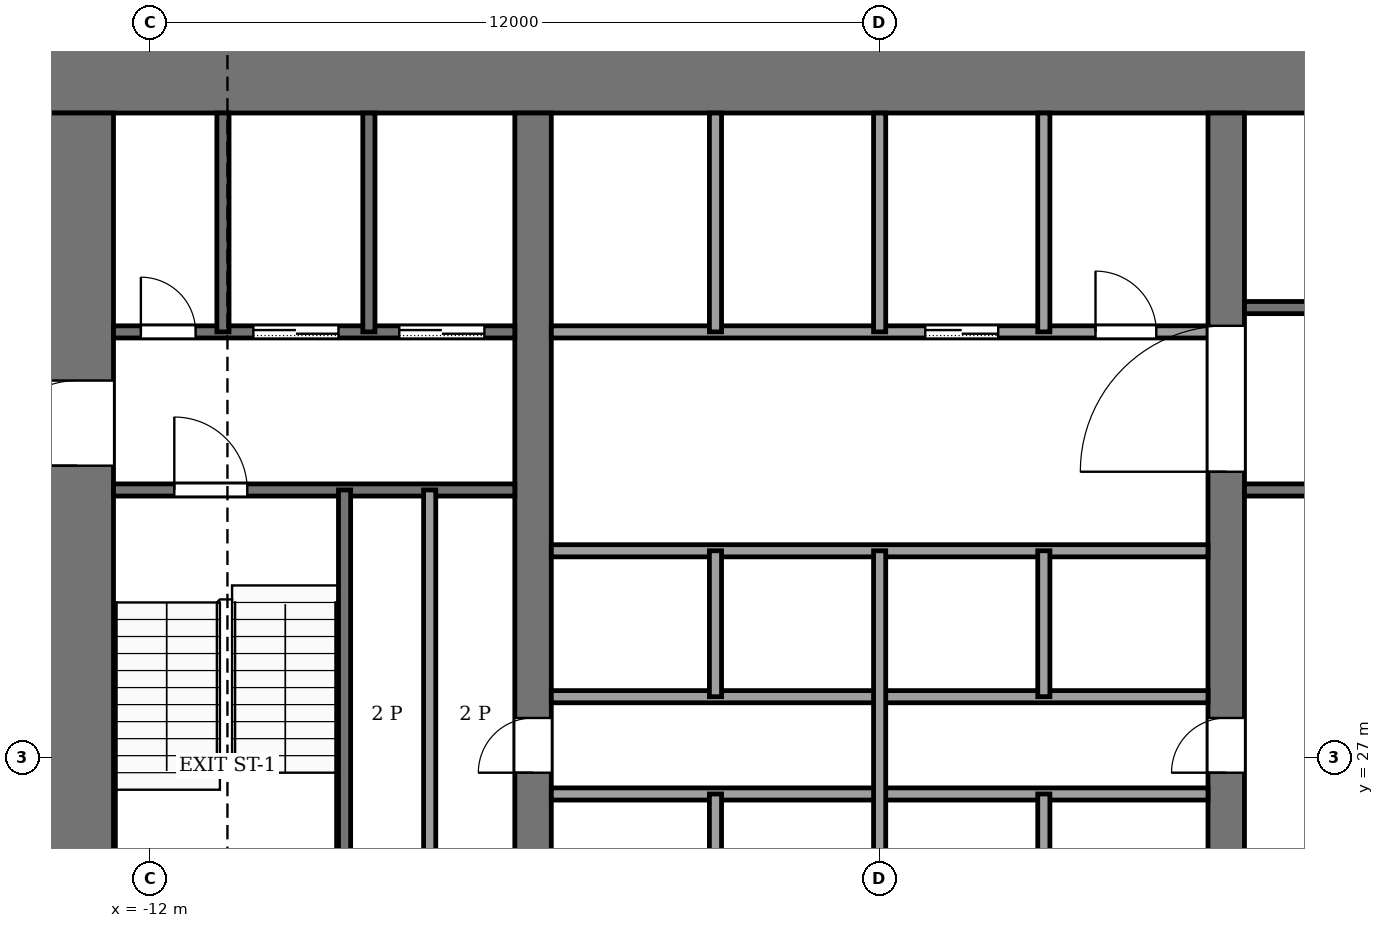
"""IFC4 building model, lengths in metres.
Left out: names, types, materials, properties, quantities, classifications, styles, units other than length and angle.
Written with IfcOpenShell. Run it as: python <this file> out.ifc"""

import sys

from ifc_helpers import new_model, si_unit, direction, frame, frame_2d, origin, place, context, subcontext, project, spatial, rectangle, extrude, element, fill, save


model = new_model("IFC4")
c1 = context("Model", 3, precision=1e-05, world=origin(), true_north=direction((0.0, 1.0)))
c2 = subcontext(c1, "Body", "Model", "MODEL_VIEW")
j1 = project(units=[si_unit("LENGTHUNIT", "METRE"), si_unit("PLANEANGLEUNIT", "RADIAN")], contexts=[c1])
p1 = place(None, origin())
s1 = spatial("IfcSite", under=j1, at=p1, CompositionType="ELEMENT")
p2 = place(p1, origin())
s2 = spatial("IfcBuilding", under=s1, at=p2, CompositionType="ELEMENT")
p3 = place(p2, frame((0.0, 0.0, 90.0)))
s3 = spatial("IfcBuildingStorey", under=s2, at=p3, CompositionType="ELEMENT", Elevation=90.0)
p4 = place(p3, frame((-13.8, 38.2, -0.13), z_axis=(0.0, 0.0, 1.0), x_axis=(1.0, 0.0, 0.0)))
e1 = element("IfcWall", 1, at=p4, inside=s3, PredefinedType="SHEAR", context=c2, shape_type="SweptSolid", body=[
    extrude(rectangle(XDim=27.6, YDim=1.2, at=frame_2d((13.8, 0.0))), origin(), (0.0, 0.0, 1.0), 4.0),
])
p5 = place(p3, frame((-13.2, 18.4, -0.13), z_axis=(0.0, 0.0, 1.0), x_axis=(0.0, 1.0, 0.0)))
e2 = element("IfcWall", 2, at=p5, inside=s3, PredefinedType="SHEAR", context=c2, shape_type="SweptSolid", body=[
    extrude(rectangle(XDim=19.2, YDim=1.2, at=frame_2d((9.6, 0.0))), origin(), (0.0, 0.0, 1.0), 4.0),
])
p6 = place(p5, frame((2.8, 0.0, 0.13)))
e3 = element("IfcOpeningElement", 3, at=p6, cuts=e2, PredefinedType="OPENING", context=c2, shape_type="SweptSolid", body=[
    extrude(rectangle(XDim=2.4, YDim=2.4, at=frame_2d((1.2, 1.2))), frame((0.0, 0.61, 0.0), z_axis=(0.0, -1.0, 0.0), x_axis=(1.0, 0.0, 0.0)), (0.0, 0.0, 1.0), 1.22),
])
p7 = place(p5, frame((13.4, 0.0, 0.13)))
e4 = element("IfcOpeningElement", 4, at=p7, cuts=e2, PredefinedType="OPENING", context=c2, shape_type="SweptSolid", body=[
    extrude(rectangle(XDim=1.4, YDim=2.2, at=frame_2d((0.7, 1.1))), frame((0.0, 0.61, 0.0), z_axis=(0.0, -1.0, 0.0), x_axis=(1.0, 0.0, 0.0)), (0.0, 0.0, 1.0), 1.22),
])
p8 = place(p3, frame((-5.7, 18.4, -0.13), z_axis=(0.0, 0.0, 1.0), x_axis=(0.0, 1.0, 0.0)))
e5 = element("IfcWall", 5, at=p8, inside=s3, PredefinedType="SHEAR", context=c2, shape_type="SweptSolid", body=[
    extrude(rectangle(XDim=19.2, YDim=0.6, at=frame_2d((9.6, 0.0))), origin(), (0.0, 0.0, 1.0), 4.0),
])
p9 = place(p8, frame((8.35, 0.0, 0.13)))
e6 = element("IfcOpeningElement", 6, at=p9, cuts=e5, PredefinedType="OPENING", context=c2, shape_type="SweptSolid", body=[
    extrude(rectangle(XDim=0.9, YDim=2.1, at=frame_2d((0.45, 1.05))), frame((0.0, 0.31, 0.0), z_axis=(0.0, -1.0, 0.0), x_axis=(1.0, 0.0, 0.0)), (0.0, 0.0, 1.0), 0.62),
])
p10 = place(p3, frame((5.7, 18.4, -0.13), z_axis=(0.0, 0.0, 1.0), x_axis=(0.0, 1.0, 0.0)))
e7 = element("IfcWall", 7, at=p10, inside=s3, PredefinedType="SHEAR", context=c2, shape_type="SweptSolid", body=[
    extrude(rectangle(XDim=19.2, YDim=0.6, at=frame_2d((9.6, 0.0))), origin(), (0.0, 0.0, 1.0), 4.0),
])
p11 = place(p10, frame((8.35, 0.0, 0.13)))
e8 = element("IfcOpeningElement", 8, at=p11, cuts=e7, PredefinedType="OPENING", context=c2, shape_type="SweptSolid", body=[
    extrude(rectangle(XDim=0.9, YDim=2.1, at=frame_2d((0.45, 1.05))), frame((0.0, 0.31, 0.0), z_axis=(0.0, -1.0, 0.0), x_axis=(1.0, 0.0, 0.0)), (0.0, 0.0, 1.0), 0.62),
])
p12 = place(p10, frame((13.3, 0.0, 0.13)))
e9 = element("IfcOpeningElement", 9, at=p12, cuts=e7, PredefinedType="OPENING", context=c2, shape_type="SweptSolid", body=[
    extrude(rectangle(XDim=2.4, YDim=2.4, at=frame_2d((1.2, 1.2))), frame((0.0, 0.31, 0.0), z_axis=(0.0, -1.0, 0.0), x_axis=(1.0, 0.0, 0.0)), (0.0, 0.0, 1.0), 0.62),
])
for number, where, z_axis, x_axis in (
    (10, (-5.4, 26.4, 0.0), (0.0, 0.0, 1.0), (1.0, 0.0, 0.0)),
    (11, (-5.4, 28.0, 0.0), (0.0, 0.0, 1.0), (1.0, 0.0, 0.0)),
    (12, (-5.4, 30.4, 0.0), (0.0, 0.0, 1.0), (1.0, 0.0, 0.0)),
):
    element("IfcWall", number, at=place(p3, frame(where, z_axis=z_axis, x_axis=x_axis)), inside=s3, PredefinedType="PARTITIONING", context=c2, shape_type="SweptSolid", body=[
        extrude(rectangle(XDim=10.8, YDim=0.2, at=frame_2d((5.4, 0.0))), origin(), (0.0, 0.0, 1.0), 3.87),
    ])
p13 = place(p3, frame((-12.6, 31.4, 0.0), z_axis=(0.0, 0.0, 1.0), x_axis=(1.0, 0.0, 0.0)))
e13 = element("IfcWall", 13, at=p13, inside=s3, PredefinedType="PARTITIONING", context=c2, shape_type="SweptSolid", body=[
    extrude(rectangle(XDim=6.6, YDim=0.2, at=frame_2d((3.3, 0.0))), origin(), (0.0, 0.0, 1.0), 3.87),
])
p14 = place(p13, frame((1.0, 0.0, 0.0)))
e14 = element("IfcOpeningElement", 14, at=p14, cuts=e13, PredefinedType="OPENING", context=c2, shape_type="SweptSolid", body=[
    extrude(rectangle(XDim=1.2, YDim=2.2, at=frame_2d((0.6, 1.1))), frame((0.0, 0.11, 0.0), z_axis=(0.0, -1.0, 0.0), x_axis=(1.0, 0.0, 0.0)), (0.0, 0.0, 1.0), 0.22),
])
p15 = place(p3, frame((6.0, 31.4, 0.0), z_axis=(0.0, 0.0, 1.0), x_axis=(1.0, 0.0, 0.0)))
e15 = element("IfcWall", 15, at=p15, inside=s3, PredefinedType="PARTITIONING", context=c2, shape_type="SweptSolid", body=[
    extrude(rectangle(XDim=6.6, YDim=0.2, at=frame_2d((3.3, 0.0))), origin(), (0.0, 0.0, 1.0), 3.87),
])
p16 = place(p3, frame((-12.6, 34.0, 0.0), z_axis=(0.0, 0.0, 1.0), x_axis=(1.0, 0.0, 0.0)))
e16 = element("IfcWall", 16, at=p16, inside=s3, PredefinedType="PARTITIONING", context=c2, shape_type="SweptSolid", body=[
    extrude(rectangle(XDim=6.6, YDim=0.2, at=frame_2d((3.3, 0.0))), origin(), (0.0, 0.0, 1.0), 3.87),
])
p17 = place(p16, frame((4.7, 0.0, 0.0)))
e17 = element("IfcOpeningElement", 17, at=p17, cuts=e16, PredefinedType="OPENING", context=c2, shape_type="SweptSolid", body=[
    extrude(rectangle(XDim=1.4, YDim=2.2, at=frame_2d((0.7, 1.1))), frame((0.0, 0.11, 0.0), z_axis=(0.0, -1.0, 0.0), x_axis=(1.0, 0.0, 0.0)), (0.0, 0.0, 1.0), 0.22),
])
p18 = place(p16, frame((2.3, 0.0, 0.0)))
e18 = element("IfcOpeningElement", 18, at=p18, cuts=e16, PredefinedType="OPENING", context=c2, shape_type="SweptSolid", body=[
    extrude(rectangle(XDim=1.4, YDim=2.2, at=frame_2d((0.7, 1.1))), frame((0.0, 0.11, 0.0), z_axis=(0.0, -1.0, 0.0), x_axis=(1.0, 0.0, 0.0)), (0.0, 0.0, 1.0), 0.22),
])
p19 = place(p16, frame((0.45, 0.0, 0.0)))
e19 = element("IfcOpeningElement", 19, at=p19, cuts=e16, PredefinedType="OPENING", context=c2, shape_type="SweptSolid", body=[
    extrude(rectangle(XDim=0.9, YDim=2.1, at=frame_2d((0.45, 1.05))), frame((0.0, 0.11, 0.0), z_axis=(0.0, -1.0, 0.0), x_axis=(1.0, 0.0, 0.0)), (0.0, 0.0, 1.0), 0.22),
])
p20 = place(p3, frame((-5.4, 34.0, 0.0), z_axis=(0.0, 0.0, 1.0), x_axis=(1.0, 0.0, 0.0)))
e20 = element("IfcWall", 20, at=p20, inside=s3, PredefinedType="PARTITIONING", context=c2, shape_type="SweptSolid", body=[
    extrude(rectangle(XDim=10.8, YDim=0.2, at=frame_2d((5.4, 0.0))), origin(), (0.0, 0.0, 1.0), 3.87),
])
p21 = place(p20, frame((6.15, 0.0, 0.0)))
e21 = element("IfcOpeningElement", 21, at=p21, cuts=e20, PredefinedType="OPENING", context=c2, shape_type="SweptSolid", body=[
    extrude(rectangle(XDim=1.2, YDim=2.2, at=frame_2d((0.6, 1.1))), frame((0.0, 0.11, 0.0), z_axis=(0.0, -1.0, 0.0), x_axis=(1.0, 0.0, 0.0)), (0.0, 0.0, 1.0), 0.22),
])
p22 = place(p20, frame((8.95, 0.0, 0.0)))
e22 = element("IfcOpeningElement", 22, at=p22, cuts=e20, PredefinedType="OPENING", context=c2, shape_type="SweptSolid", body=[
    extrude(rectangle(XDim=1.0, YDim=2.1, at=frame_2d((0.5, 1.05))), frame((0.0, 0.11, 0.0), z_axis=(0.0, -1.0, 0.0), x_axis=(1.0, 0.0, 0.0)), (0.0, 0.0, 1.0), 0.22),
])
p23 = place(p3, frame((6.0, 34.4, 0.0), z_axis=(0.0, 0.0, 1.0), x_axis=(1.0, 0.0, 0.0)))
e23 = element("IfcWall", 23, at=p23, inside=s3, PredefinedType="PARTITIONING", context=c2, shape_type="SweptSolid", body=[
    extrude(rectangle(XDim=6.6, YDim=0.2, at=frame_2d((3.3, 0.0))), origin(), (0.0, 0.0, 1.0), 3.87),
])
p24 = place(p23, frame((4.8, 0.0, 0.0)))
e24 = element("IfcOpeningElement", 24, at=p24, cuts=e23, PredefinedType="OPENING", context=c2, shape_type="SweptSolid", body=[
    extrude(rectangle(XDim=1.2, YDim=2.2, at=frame_2d((0.6, 1.1))), frame((0.0, 0.11, 0.0), z_axis=(0.0, -1.0, 0.0), x_axis=(1.0, 0.0, 0.0)), (0.0, 0.0, 1.0), 0.22),
])
p25 = place(p3, frame((-10.8, 34.0, 0.0), z_axis=(0.0, 0.0, 1.0), x_axis=(0.0, 1.0, 0.0)))
e25 = element("IfcWall", 25, at=p25, inside=s3, PredefinedType="PARTITIONING", context=c2, shape_type="SweptSolid", body=[
    extrude(rectangle(XDim=3.6, YDim=0.2, at=frame_2d((1.8, 0.0))), origin(), (0.0, 0.0, 1.0), 3.87),
])
p26 = place(p3, frame((-8.8, 24.0, 0.0), z_axis=(0.0, 0.0, 1.0), x_axis=(0.0, 1.0, 0.0)))
e26 = element("IfcWall", 26, at=p26, inside=s3, PredefinedType="PARTITIONING", context=c2, shape_type="SweptSolid", body=[
    extrude(rectangle(XDim=7.4, YDim=0.2, at=frame_2d((3.7, 0.0))), origin(), (0.0, 0.0, 1.0), 3.87),
])
p27 = place(p3, frame((-8.4, 34.0, 0.0), z_axis=(0.0, 0.0, 1.0), x_axis=(0.0, 1.0, 0.0)))
e27 = element("IfcWall", 27, at=p27, inside=s3, PredefinedType="PARTITIONING", context=c2, shape_type="SweptSolid", body=[
    extrude(rectangle(XDim=3.6, YDim=0.2, at=frame_2d((1.8, 0.0))), origin(), (0.0, 0.0, 1.0), 3.87),
])
p28 = place(p3, frame((-7.4, 24.0, 0.0), z_axis=(0.0, 0.0, 1.0), x_axis=(0.0, 1.0, 0.0)))
e28 = element("IfcWall", 28, at=p28, inside=s3, PredefinedType="PARTITIONING", context=c2, shape_type="SweptSolid", body=[
    extrude(rectangle(XDim=7.4, YDim=0.2, at=frame_2d((3.7, 0.0))), origin(), (0.0, 0.0, 1.0), 3.87),
])
for number, where, z_axis, x_axis in (
    (29, (-2.7, 24.0, 0.0), (0.0, 0.0, 1.0), (0.0, 1.0, 0.0)),
    (30, (-2.7, 28.0, 0.0), (0.0, 0.0, 1.0), (0.0, 1.0, 0.0)),
):
    element("IfcWall", number, at=place(p3, frame(where, z_axis=z_axis, x_axis=x_axis)), inside=s3, PredefinedType="PARTITIONING", context=c2, shape_type="SweptSolid", body=[
        extrude(rectangle(XDim=2.4, YDim=0.2, at=frame_2d((1.2, 0.0))), origin(), (0.0, 0.0, 1.0), 3.87),
    ])
p29 = place(p3, frame((-2.7, 34.0, 0.0), z_axis=(0.0, 0.0, 1.0), x_axis=(0.0, 1.0, 0.0)))
e31 = element("IfcWall", 31, at=p29, inside=s3, PredefinedType="PARTITIONING", context=c2, shape_type="SweptSolid", body=[
    extrude(rectangle(XDim=3.6, YDim=0.2, at=frame_2d((1.8, 0.0))), origin(), (0.0, 0.0, 1.0), 3.87),
])
p30 = place(p3, frame((0.0, 24.0, 0.0), z_axis=(0.0, 0.0, 1.0), x_axis=(0.0, 1.0, 0.0)))
e32 = element("IfcWall", 32, at=p30, inside=s3, PredefinedType="PARTITIONING", context=c2, shape_type="SweptSolid", body=[
    extrude(rectangle(XDim=6.4, YDim=0.2, at=frame_2d((3.2, 0.0))), origin(), (0.0, 0.0, 1.0), 3.87),
])
p31 = place(p3, frame((0.0, 34.0, 0.0), z_axis=(0.0, 0.0, 1.0), x_axis=(0.0, 1.0, 0.0)))
e33 = element("IfcWall", 33, at=p31, inside=s3, PredefinedType="PARTITIONING", context=c2, shape_type="SweptSolid", body=[
    extrude(rectangle(XDim=3.6, YDim=0.2, at=frame_2d((1.8, 0.0))), origin(), (0.0, 0.0, 1.0), 3.87),
])
for number, where, z_axis, x_axis in (
    (34, (2.7, 24.0, 0.0), (0.0, 0.0, 1.0), (0.0, 1.0, 0.0)),
    (35, (2.7, 28.0, 0.0), (0.0, 0.0, 1.0), (0.0, 1.0, 0.0)),
):
    element("IfcWall", number, at=place(p3, frame(where, z_axis=z_axis, x_axis=x_axis)), inside=s3, PredefinedType="PARTITIONING", context=c2, shape_type="SweptSolid", body=[
        extrude(rectangle(XDim=2.4, YDim=0.2, at=frame_2d((1.2, 0.0))), origin(), (0.0, 0.0, 1.0), 3.87),
    ])
p32 = place(p3, frame((2.7, 34.0, 0.0), z_axis=(0.0, 0.0, 1.0), x_axis=(0.0, 1.0, 0.0)))
e36 = element("IfcWall", 36, at=p32, inside=s3, PredefinedType="PARTITIONING", context=c2, shape_type="SweptSolid", body=[
    extrude(rectangle(XDim=3.6, YDim=0.2, at=frame_2d((1.8, 0.0))), origin(), (0.0, 0.0, 1.0), 3.87),
])
p33 = place(p21, origin())
e37 = element("IfcDoor", 37, at=p33, inside=s3, OperationType="SLIDING_TO_LEFT", PredefinedType="DOOR", context=c2, shape_type="SweptSolid", body=[
    extrude(rectangle(XDim=1.2, YDim=2.2, at=frame_2d((0.6, 1.1))), frame((0.0, 0.025, 0.0), z_axis=(0.0, -1.0, 0.0), x_axis=(1.0, 0.0, 0.0)), (0.0, 0.0, 1.0), 0.05),
])
fill(e21, e37)
p34 = place(p17, origin())
e38 = element("IfcDoor", 38, at=p34, inside=s3, OperationType="SLIDING_TO_LEFT", PredefinedType="DOOR", context=c2, shape_type="SweptSolid", body=[
    extrude(rectangle(XDim=1.4, YDim=2.2, at=frame_2d((0.7, 1.1))), frame((0.0, 0.025, 0.0), z_axis=(0.0, -1.0, 0.0), x_axis=(1.0, 0.0, 0.0)), (0.0, 0.0, 1.0), 0.05),
])
fill(e17, e38)
p35 = place(p18, origin())
e39 = element("IfcDoor", 39, at=p35, inside=s3, OperationType="SLIDING_TO_LEFT", PredefinedType="DOOR", context=c2, shape_type="SweptSolid", body=[
    extrude(rectangle(XDim=1.4, YDim=2.2, at=frame_2d((0.7, 1.1))), frame((0.0, 0.025, 0.0), z_axis=(0.0, -1.0, 0.0), x_axis=(1.0, 0.0, 0.0)), (0.0, 0.0, 1.0), 0.05),
])
fill(e18, e39)
p36 = place(p19, origin())
e40 = element("IfcDoor", 40, at=p36, inside=s3, OperationType="SINGLE_SWING_RIGHT", PredefinedType="DOOR", context=c2, shape_type="SweptSolid", body=[
    extrude(rectangle(XDim=0.9, YDim=2.1, at=frame_2d((0.45, 1.05))), frame((0.0, 0.025, 0.0), z_axis=(0.0, -1.0, 0.0), x_axis=(1.0, 0.0, 0.0)), (0.0, 0.0, 1.0), 0.05),
])
fill(e19, e40)
p37 = place(p22, origin())
e41 = element("IfcDoor", 41, at=p37, inside=s3, OperationType="SINGLE_SWING_LEFT", PredefinedType="DOOR", context=c2, shape_type="SweptSolid", body=[
    extrude(rectangle(XDim=1.0, YDim=2.1, at=frame_2d((0.5, 1.05))), frame((0.0, 0.025, 0.0), z_axis=(0.0, -1.0, 0.0), x_axis=(1.0, 0.0, 0.0)), (0.0, 0.0, 1.0), 0.05),
])
fill(e22, e41)
p38 = place(p9, origin())
e42 = element("IfcDoor", 42, at=p38, inside=s3, OperationType="SINGLE_SWING_LEFT", PredefinedType="DOOR", context=c2, shape_type="SweptSolid", body=[
    extrude(rectangle(XDim=0.9, YDim=2.1, at=frame_2d((0.45, 1.05))), frame((0.0, 0.025, 0.0), z_axis=(0.0, -1.0, 0.0), x_axis=(1.0, 0.0, 0.0)), (0.0, 0.0, 1.0), 0.05),
])
fill(e6, e42)
p39 = place(p11, origin())
e43 = element("IfcDoor", 43, at=p39, inside=s3, OperationType="SINGLE_SWING_RIGHT", PredefinedType="DOOR", context=c2, shape_type="SweptSolid", body=[
    extrude(rectangle(XDim=0.9, YDim=2.1, at=frame_2d((0.45, 1.05))), frame((0.0, 0.025, 0.0), z_axis=(0.0, -1.0, 0.0), x_axis=(1.0, 0.0, 0.0)), (0.0, 0.0, 1.0), 0.05),
])
fill(e8, e43)
p40 = place(p14, origin())
e44 = element("IfcDoor", 44, at=p40, inside=s3, OperationType="SINGLE_SWING_RIGHT", PredefinedType="DOOR", context=c2, shape_type="SweptSolid", body=[
    extrude(rectangle(XDim=1.2, YDim=2.2, at=frame_2d((0.6, 1.1))), frame((0.0, 0.025, 0.0), z_axis=(0.0, -1.0, 0.0), x_axis=(1.0, 0.0, 0.0)), (0.0, 0.0, 1.0), 0.05),
])
fill(e14, e44)
p41 = place(p12, origin())
e45 = element("IfcDoor", 45, at=p41, inside=s3, OperationType="DOUBLE_DOOR_SINGLE_SWING", PredefinedType="DOOR", context=c2, shape_type="SweptSolid", body=[
    extrude(rectangle(XDim=2.4, YDim=2.4, at=frame_2d((1.2, 1.2))), frame((0.0, 0.025, 0.0), z_axis=(0.0, -1.0, 0.0), x_axis=(1.0, 0.0, 0.0)), (0.0, 0.0, 1.0), 0.05),
])
fill(e9, e45)
p42 = place(p7, origin())
e46 = element("IfcDoor", 46, at=p42, inside=s3, OperationType="SINGLE_SWING_RIGHT", PredefinedType="DOOR", context=c2, shape_type="SweptSolid", body=[
    extrude(rectangle(XDim=1.4, YDim=2.2, at=frame_2d((0.7, 1.1))), frame((0.0, 0.025, 0.0), z_axis=(0.0, -1.0, 0.0), x_axis=(1.0, 0.0, 0.0)), (0.0, 0.0, 1.0), 0.05),
])
fill(e4, e46)
save(model, sys.argv[1])
